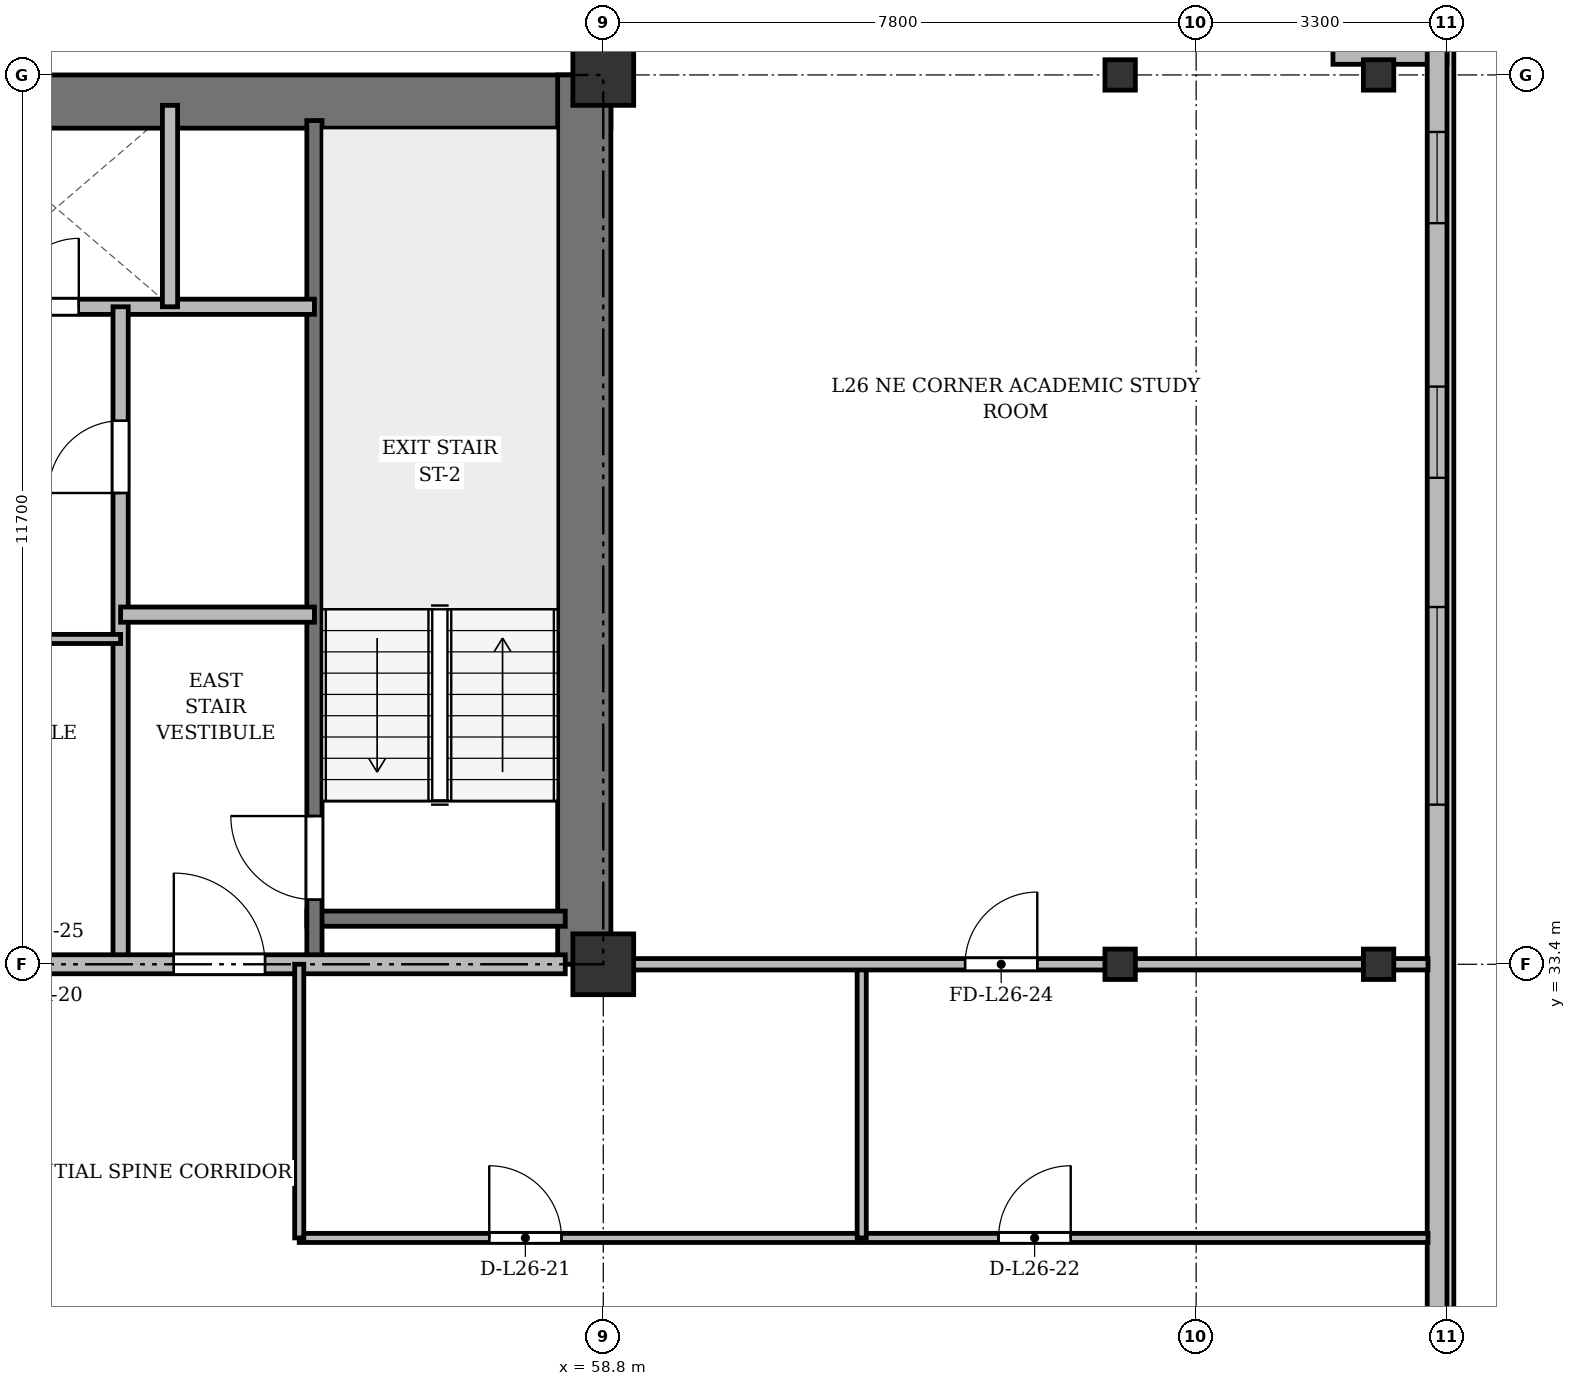
"""IFC4 building model, lengths in metres.
Left out: names, types, materials, properties, quantities, classifications, styles, units other than length and angle.
Written with IfcOpenShell. Run it as: python <this file> out.ifc"""

import sys

from ifc_helpers import new_model, si_unit, direction, frame, frame_2d, origin, origin_2d, place, context, subcontext, project, spatial, rectangle, i_section, extrude, source, transform, mapped, element, fill, save


model = new_model("IFC4")
c1 = context("Model", 3, precision=1e-05, world=origin(), true_north=direction((0.0, 1.0)))
c2 = subcontext(c1, "Body", "Model", "MODEL_VIEW")
j1 = project(units=[si_unit("LENGTHUNIT", "METRE"), si_unit("PLANEANGLEUNIT", "RADIAN")], contexts=[c1])
p1 = place(None, origin())
s1 = spatial("IfcSite", under=j1, at=p1, CompositionType="ELEMENT")
p2 = place(p1, origin())
s2 = spatial("IfcBuilding", under=s1, at=p2, CompositionType="ELEMENT")
p3 = place(p2, frame((0.0, 0.0, 103.3)))
s3 = spatial("IfcBuildingStorey", under=s2, at=p3, CompositionType="ELEMENT", Elevation=103.3)
m1 = source(origin(), c2, "Body", "SweptSolid", [
    extrude(rectangle(XDim=0.8, YDim=0.8, at=origin_2d()), origin(), (0.0, 0.0, 1.0), 3.6),
])
for number, where, z_axis, x_axis in (
    (1, (58.8, 33.4, 0.0), (0.0, 0.0, 1.0), (1.0, 0.0, 0.0)),
    (2, (58.8, 45.1, 0.0), (0.0, 0.0, 1.0), (1.0, 0.0, 0.0)),
):
    element("IfcColumn", number, at=place(p3, frame(where, z_axis=z_axis, x_axis=x_axis)), inside=s3, PredefinedType="COLUMN", context=c2, shape_type="MappedRepresentation", body=[
        mapped(m1, transform((0.0, 0.0, 0.0), x_axis=(1.0, 0.0, 0.0), y_axis=(0.0, 1.0, 0.0), z_axis=(0.0, 0.0, 1.0), scale=1.0)),
    ])
m2 = source(origin(), c2, "Body", "SweptSolid", [
    extrude(i_section(OverallWidth=0.4, OverallDepth=0.4, WebThickness=0.022, FlangeThickness=0.035, at=origin_2d()), origin(), (0.0, 0.0, 1.0), 3.6),
])
for number, where, z_axis, x_axis in (
    (3, (65.6, 33.4, 0.0), (0.0, 0.0, 1.0), (1.0, 0.0, 0.0)),
    (4, (65.6, 45.1, 0.0), (0.0, 0.0, 1.0), (1.0, 0.0, 0.0)),
    (5, (69.0, 33.4, 0.0), (0.0, 0.0, 1.0), (1.0, 0.0, 0.0)),
    (6, (69.0, 45.1, 0.0), (0.0, 0.0, 1.0), (1.0, 0.0, 0.0)),
):
    element("IfcColumn", number, at=place(p3, frame(where, z_axis=z_axis, x_axis=x_axis)), inside=s3, PredefinedType="COLUMN", context=c2, shape_type="MappedRepresentation", body=[
        mapped(m2, transform((0.0, 0.0, 0.0), x_axis=(1.0, 0.0, 0.0), y_axis=(0.0, 1.0, 0.0), z_axis=(0.0, 0.0, 1.0), scale=1.0)),
    ])
p4 = place(p3, frame((68.4, 45.37, 0.0), z_axis=(0.0, 0.0, 1.0), x_axis=(1.0, 0.0, 0.0)))
e7 = element("IfcWall", 7, at=p4, inside=s3, PredefinedType="SOLIDWALL", context=c2, shape_type="SweptSolid", body=[
    extrude(rectangle(XDim=1.5, YDim=0.26, at=frame_2d((0.75, 0.0))), origin(), (0.0, 0.0, 1.0), 2.752),
])
p5 = place(p3, frame((69.77, 45.5, 0.0), z_axis=(0.0, 0.0, 1.0), x_axis=(0.0, -1.0, 0.0)))
e8 = element("IfcWall", 8, at=p5, inside=s3, PredefinedType="SOLIDWALL", context=c2, shape_type="SweptSolid", body=[
    extrude(rectangle(XDim=39.6, YDim=0.26, at=frame_2d((19.8, 0.0))), origin(), (0.0, 0.0, 1.0), 3.34),
])
p6 = place(p5, frame((36.95, 0.0, 0.92)))
e9 = element("IfcOpeningElement", 9, at=p6, cuts=e8, PredefinedType="OPENING", context=c2, shape_type="SweptSolid", body=[
    extrude(rectangle(XDim=1.2, YDim=1.65, at=frame_2d((0.6, 0.825))), frame((0.0, 0.14, 0.0), z_axis=(0.0, -1.0, 0.0), x_axis=(1.0, 0.0, 0.0)), (0.0, 0.0, 1.0), 0.28),
])
p7 = place(p5, frame((32.8, 0.0, 0.92)))
e10 = element("IfcOpeningElement", 10, at=p7, cuts=e8, PredefinedType="OPENING", context=c2, shape_type="SweptSolid", body=[
    extrude(rectangle(XDim=2.6, YDim=1.9, at=frame_2d((1.3, 0.95))), frame((0.0, 0.14, 0.0), z_axis=(0.0, -1.0, 0.0), x_axis=(1.0, 0.0, 0.0)), (0.0, 0.0, 1.0), 0.28),
])
p8 = place(p5, frame((28.6, 0.0, 0.92)))
e11 = element("IfcOpeningElement", 11, at=p8, cuts=e8, PredefinedType="OPENING", context=c2, shape_type="SweptSolid", body=[
    extrude(rectangle(XDim=2.6, YDim=1.9, at=frame_2d((1.3, 0.95))), frame((0.0, 0.14, 0.0), z_axis=(0.0, -1.0, 0.0), x_axis=(1.0, 0.0, 0.0)), (0.0, 0.0, 1.0), 0.28),
])
p9 = place(p5, frame((21.4, 0.0, 0.92)))
e12 = element("IfcOpeningElement", 12, at=p9, cuts=e8, PredefinedType="OPENING", context=c2, shape_type="SweptSolid", body=[
    extrude(rectangle(XDim=2.6, YDim=1.9, at=frame_2d((1.3, 0.95))), frame((0.0, 0.14, 0.0), z_axis=(0.0, -1.0, 0.0), x_axis=(1.0, 0.0, 0.0)), (0.0, 0.0, 1.0), 0.28),
])
p10 = place(p5, frame((7.4, 0.0, 0.92)))
e13 = element("IfcOpeningElement", 13, at=p10, cuts=e8, PredefinedType="OPENING", context=c2, shape_type="SweptSolid", body=[
    extrude(rectangle(XDim=2.6, YDim=1.9, at=frame_2d((1.3, 0.95))), frame((0.0, 0.14, 0.0), z_axis=(0.0, -1.0, 0.0), x_axis=(1.0, 0.0, 0.0)), (0.0, 0.0, 1.0), 0.28),
])
p11 = place(p5, frame((4.5, 0.0, 0.92)))
e14 = element("IfcOpeningElement", 14, at=p11, cuts=e8, PredefinedType="OPENING", context=c2, shape_type="SweptSolid", body=[
    extrude(rectangle(XDim=1.2, YDim=1.65, at=frame_2d((0.6, 0.825))), frame((0.0, 0.14, 0.0), z_axis=(0.0, -1.0, 0.0), x_axis=(1.0, 0.0, 0.0)), (0.0, 0.0, 1.0), 0.28),
])
p12 = place(p5, frame((1.15, 0.0, 0.92)))
e15 = element("IfcOpeningElement", 15, at=p12, cuts=e8, PredefinedType="OPENING", context=c2, shape_type="SweptSolid", body=[
    extrude(rectangle(XDim=1.2, YDim=1.65, at=frame_2d((0.6, 0.825))), frame((0.0, 0.14, 0.0), z_axis=(0.0, -1.0, 0.0), x_axis=(1.0, 0.0, 0.0)), (0.0, 0.0, 1.0), 0.28),
])
p13 = place(p3, frame((15.5, 44.75, 0.0), z_axis=(0.0, 0.0, 1.0), x_axis=(1.0, 0.0, 0.0)))
e16 = element("IfcWall", 16, at=p13, inside=s3, PredefinedType="SHEAR", context=c2, shape_type="SweptSolid", body=[
    extrude(rectangle(XDim=43.4, YDim=0.7, at=frame_2d((21.7, 0.0))), origin(), (0.0, 0.0, 1.0), 3.34),
])
p14 = place(p3, frame((58.55, 33.4, 0.0), z_axis=(0.0, 0.0, 1.0), x_axis=(0.0, 1.0, 0.0)))
e17 = element("IfcWall", 17, at=p14, inside=s3, PredefinedType="SHEAR", context=c2, shape_type="SweptSolid", body=[
    extrude(rectangle(XDim=11.7, YDim=0.7, at=frame_2d((5.85, 0.0))), origin(), (0.0, 0.0, 1.0), 3.34),
])
p15 = place(p3, frame((54.9, 34.0, 0.0), z_axis=(0.0, 0.0, 1.0), x_axis=(1.0, 0.0, 0.0)))
e18 = element("IfcWall", 18, at=p15, inside=s3, PredefinedType="SHEAR", context=c2, shape_type="SweptSolid", body=[
    extrude(rectangle(XDim=3.4, YDim=0.2, at=frame_2d((1.7, 0.0))), origin(), (0.0, 0.0, 1.0), 3.34),
])
p16 = place(p3, frame((55.0, 33.4, 0.0), z_axis=(0.0, 0.0, 1.0), x_axis=(0.0, 1.0, 0.0)))
e19 = element("IfcWall", 19, at=p16, inside=s3, PredefinedType="SHEAR", context=c2, shape_type="SweptSolid", body=[
    extrude(rectangle(XDim=11.1, YDim=0.2, at=frame_2d((5.55, 0.0))), origin(), (0.0, 0.0, 1.0), 3.34),
])
p17 = place(p16, frame((0.85, 0.0, 0.0)))
e20 = element("IfcOpeningElement", 20, at=p17, cuts=e19, PredefinedType="OPENING", context=c2, shape_type="SweptSolid", body=[
    extrude(rectangle(XDim=1.1, YDim=2.15, at=frame_2d((0.55, 1.075))), frame((0.0, 0.11, 0.0), z_axis=(0.0, -1.0, 0.0), x_axis=(1.0, 0.0, 0.0)), (0.0, 0.0, 1.0), 0.22),
])
p18 = place(p3, frame((47.15, 42.05, 0.0), z_axis=(0.0, 0.0, 1.0), x_axis=(1.0, 0.0, 0.0)))
e21 = element("IfcWall", 21, at=p18, inside=s3, PredefinedType="SOLIDWALL", context=c2, shape_type="SweptSolid", body=[
    extrude(rectangle(XDim=7.85, YDim=0.2, at=frame_2d((3.925, 0.0))), origin(), (0.0, 0.0, 1.0), 2.84),
])
p19 = place(p18, frame((0.75, 0.0, 0.0)))
e22 = element("IfcOpeningElement", 22, at=p19, cuts=e21, PredefinedType="OPENING", context=c2, shape_type="SweptSolid", body=[
    extrude(rectangle(XDim=0.9, YDim=2.1, at=frame_2d((0.45, 1.05))), frame((0.0, 0.11, 0.0), z_axis=(0.0, -1.0, 0.0), x_axis=(1.0, 0.0, 0.0)), (0.0, 0.0, 1.0), 0.22),
])
p20 = place(p18, frame((3.85, 0.0, 0.0)))
e23 = element("IfcOpeningElement", 23, at=p20, cuts=e21, PredefinedType="OPENING", context=c2, shape_type="SweptSolid", body=[
    extrude(rectangle(XDim=0.9, YDim=2.1, at=frame_2d((0.45, 1.05))), frame((0.0, 0.11, 0.0), z_axis=(0.0, -1.0, 0.0), x_axis=(1.0, 0.0, 0.0)), (0.0, 0.0, 1.0), 0.22),
])
p21 = place(p3, frame((53.1, 42.05, 0.0), z_axis=(0.0, 0.0, 1.0), x_axis=(0.0, 1.0, 0.0)))
e24 = element("IfcWall", 24, at=p21, inside=s3, PredefinedType="SOLIDWALL", context=c2, shape_type="SweptSolid", body=[
    extrude(rectangle(XDim=2.65, YDim=0.2, at=frame_2d((1.325, 0.0))), origin(), (0.0, 0.0, 1.0), 3.34),
])
p22 = place(p3, frame((52.45, 33.4, 0.0), z_axis=(0.0, 0.0, 1.0), x_axis=(0.0, 1.0, 0.0)))
e25 = element("IfcWall", 25, at=p22, inside=s3, PredefinedType="PARTITIONING", context=c2, shape_type="SweptSolid", body=[
    extrude(rectangle(XDim=8.65, YDim=0.2, at=frame_2d((4.325, 0.0))), origin(), (0.0, 0.0, 1.0), 2.752),
])
p23 = place(p22, frame((6.2, 0.0, 0.0)))
e26 = element("IfcOpeningElement", 26, at=p23, cuts=e25, PredefinedType="OPENING", context=c2, shape_type="SweptSolid", body=[
    extrude(rectangle(XDim=0.95, YDim=2.15, at=frame_2d((0.475, 1.075))), frame((0.0, 0.11, 0.0), z_axis=(0.0, -1.0, 0.0), x_axis=(1.0, 0.0, 0.0)), (0.0, 0.0, 1.0), 0.22),
])
p24 = place(p3, frame((52.45, 38.0, 0.0), z_axis=(0.0, 0.0, 1.0), x_axis=(1.0, 0.0, 0.0)))
e27 = element("IfcWall", 27, at=p24, inside=s3, PredefinedType="PARTITIONING", context=c2, shape_type="SweptSolid", body=[
    extrude(rectangle(XDim=2.55, YDim=0.2, at=frame_2d((1.275, 0.0))), origin(), (0.0, 0.0, 1.0), 3.34),
])
p25 = place(p3, frame((49.42, 37.68, 0.0), z_axis=(0.0, 0.0, 1.0), x_axis=(1.0, 0.0, 0.0)))
e28 = element("IfcWall", 28, at=p25, inside=s3, PredefinedType="PARTITIONING", context=c2, shape_type="SweptSolid", body=[
    extrude(rectangle(XDim=3.03, YDim=0.12, at=frame_2d((1.515, 0.0))), origin(), (0.0, 0.0, 1.0), 2.84),
])
p26 = place(p3, frame((47.15, 33.4, 0.0), z_axis=(0.0, 0.0, 1.0), x_axis=(1.0, 0.0, 0.0)))
e29 = element("IfcWall", 29, at=p26, inside=s3, PredefinedType="PARTITIONING", context=c2, shape_type="SweptSolid", body=[
    extrude(rectangle(XDim=11.15, YDim=0.25, at=frame_2d((5.575, 0.0))), origin(), (0.0, 0.0, 1.0), 2.752),
])
p27 = place(p26, frame((0.7, 0.0, 0.0)))
e30 = element("IfcOpeningElement", 30, at=p27, cuts=e29, PredefinedType="OPENING", context=c2, shape_type="SweptSolid", body=[
    extrude(rectangle(XDim=0.95, YDim=2.15, at=frame_2d((0.475, 1.075))), frame((0.0, 0.135, 0.0), z_axis=(0.0, -1.0, 0.0), x_axis=(1.0, 0.0, 0.0)), (0.0, 0.0, 1.0), 0.27),
])
p28 = place(p26, frame((6.0, 0.0, 0.0)))
e31 = element("IfcOpeningElement", 31, at=p28, cuts=e29, PredefinedType="OPENING", context=c2, shape_type="SweptSolid", body=[
    extrude(rectangle(XDim=1.2, YDim=2.15, at=frame_2d((0.6, 1.075))), frame((0.0, 0.135, 0.0), z_axis=(0.0, -1.0, 0.0), x_axis=(1.0, 0.0, 0.0)), (0.0, 0.0, 1.0), 0.27),
])
p29 = place(p3, frame((54.8, 29.8, 0.0), z_axis=(0.0, 0.0, 1.0), x_axis=(1.0, 0.0, 0.0)))
e32 = element("IfcWall", 32, at=p29, inside=s3, PredefinedType="PARTITIONING", context=c2, shape_type="SweptSolid", body=[
    extrude(rectangle(XDim=14.85, YDim=0.12, at=frame_2d((7.425, 0.0))), origin(), (0.0, 0.0, 1.0), 2.84),
])
p30 = place(p29, frame((2.5, 0.0, 0.0)))
e33 = element("IfcOpeningElement", 33, at=p30, cuts=e32, PredefinedType="OPENING", context=c2, shape_type="SweptSolid", body=[
    extrude(rectangle(XDim=0.95, YDim=2.15, at=frame_2d((0.475, 1.075))), frame((0.0, 0.07, 0.0), z_axis=(0.0, -1.0, 0.0), x_axis=(1.0, 0.0, 0.0)), (0.0, 0.0, 1.0), 0.14),
])
p31 = place(p29, frame((9.2, 0.0, 0.0)))
e34 = element("IfcOpeningElement", 34, at=p31, cuts=e32, PredefinedType="OPENING", context=c2, shape_type="SweptSolid", body=[
    extrude(rectangle(XDim=0.95, YDim=2.15, at=frame_2d((0.475, 1.075))), frame((0.0, 0.07, 0.0), z_axis=(0.0, -1.0, 0.0), x_axis=(1.0, 0.0, 0.0)), (0.0, 0.0, 1.0), 0.14),
])
for number, where, z_axis, x_axis in (
    (35, (62.2, 29.8, 0.0), (0.0, 0.0, 1.0), (0.0, 1.0, 0.0)),
    (36, (54.8, 29.8, 0.0), (0.0, 0.0, 1.0), (0.0, 1.0, 0.0)),
):
    element("IfcWall", number, at=place(p3, frame(where, z_axis=z_axis, x_axis=x_axis)), inside=s3, PredefinedType="PARTITIONING", context=c2, shape_type="SweptSolid", body=[
        extrude(rectangle(XDim=3.6, YDim=0.12, at=frame_2d((1.8, 0.0))), origin(), (0.0, 0.0, 1.0), 2.752),
    ])
p32 = place(p3, frame((58.8, 33.4, 0.0), z_axis=(0.0, 0.0, 1.0), x_axis=(1.0, 0.0, 0.0)))
e37 = element("IfcWall", 37, at=p32, inside=s3, PredefinedType="PARTITIONING", context=c2, shape_type="SweptSolid", body=[
    extrude(rectangle(XDim=10.85, YDim=0.15, at=frame_2d((5.425, 0.0))), origin(), (0.0, 0.0, 1.0), 2.752),
])
p33 = place(p32, frame((4.76, 0.0, 0.0)))
e38 = element("IfcOpeningElement", 38, at=p33, cuts=e37, PredefinedType="OPENING", context=c2, shape_type="SweptSolid", body=[
    extrude(rectangle(XDim=0.95, YDim=2.15, at=frame_2d((0.475, 1.075))), frame((0.0, 0.085, 0.0), z_axis=(0.0, -1.0, 0.0), x_axis=(1.0, 0.0, 0.0)), (0.0, 0.0, 1.0), 0.17),
])
p34 = place(p3, frame((58.8, 44.75, 0.0), z_axis=(0.0, 0.0, 1.0), x_axis=(0.0, 1.0, 0.0)))
e39 = element("IfcWall", 39, at=p34, inside=s3, PredefinedType="PARTITIONING", context=c2, shape_type="SweptSolid", body=[
    extrude(rectangle(XDim=3.61, YDim=0.15, at=frame_2d((1.805, 0.0))), origin(), (0.0, 0.0, 1.0), 2.84),
])
p35 = place(p34, frame((1.1, 0.0, 0.0)))
e40 = element("IfcOpeningElement", 40, at=p35, cuts=e39, PredefinedType="OPENING", context=c2, shape_type="SweptSolid", body=[
    extrude(rectangle(XDim=0.95, YDim=2.15, at=frame_2d((0.475, 1.075))), frame((0.0, 0.085, 0.0), z_axis=(0.0, -1.0, 0.0), x_axis=(1.0, 0.0, 0.0)), (0.0, 0.0, 1.0), 0.17),
])
m3 = source(origin(), c2, "Body", "SweptSolid", [
    extrude(rectangle(XDim=2.6, YDim=1.9, at=frame_2d((1.3, 0.95))), frame((0.0, 0.03, 0.0), z_axis=(0.0, -1.0, 0.0), x_axis=(1.0, 0.0, 0.0)), (0.0, 0.0, 1.0), 0.06),
])
p36 = place(p10, origin())
e41 = element("IfcWindow", 41, at=p36, inside=s3, PartitioningType="SINGLE_PANEL", PredefinedType="WINDOW", context=c2, shape_type="MappedRepresentation", body=[
    mapped(m3, transform((0.0, 0.0, 0.0), x_axis=(1.0, 0.0, 0.0), y_axis=(0.0, 1.0, 0.0), z_axis=(0.0, 0.0, 1.0), scale=1.0)),
])
fill(e13, e41)
m4 = source(origin(), c2, "Body", "SweptSolid", [
    extrude(rectangle(XDim=1.2, YDim=1.65, at=frame_2d((0.6, 0.825))), frame((0.0, 0.03, 0.0), z_axis=(0.0, -1.0, 0.0), x_axis=(1.0, 0.0, 0.0)), (0.0, 0.0, 1.0), 0.06),
])
p37 = place(p11, origin())
e42 = element("IfcWindow", 42, at=p37, inside=s3, PartitioningType="SINGLE_PANEL", PredefinedType="WINDOW", context=c2, shape_type="MappedRepresentation", body=[
    mapped(m4, transform((0.0, 0.0, 0.0), x_axis=(1.0, 0.0, 0.0), y_axis=(0.0, 1.0, 0.0), z_axis=(0.0, 0.0, 1.0), scale=1.0)),
])
fill(e14, e42)
p38 = place(p12, origin())
e43 = element("IfcWindow", 43, at=p38, inside=s3, PartitioningType="SINGLE_PANEL", PredefinedType="WINDOW", context=c2, shape_type="MappedRepresentation", body=[
    mapped(m4, transform((0.0, 0.0, 0.0), x_axis=(1.0, 0.0, 0.0), y_axis=(0.0, 1.0, 0.0), z_axis=(0.0, 0.0, 1.0), scale=1.0)),
])
fill(e15, e43)
m5 = source(origin(), c2, "Body", "SweptSolid", [
    extrude(rectangle(XDim=1.1, YDim=2.15, at=frame_2d((0.55, 1.075))), frame((0.0, 0.025, 0.0), z_axis=(0.0, -1.0, 0.0), x_axis=(1.0, 0.0, 0.0)), (0.0, 0.0, 1.0), 0.05),
])
p39 = place(p17, origin())
e44 = element("IfcDoor", 44, at=p39, inside=s3, OperationType="SINGLE_SWING_RIGHT", PredefinedType="DOOR", context=c2, shape_type="MappedRepresentation", body=[
    mapped(m5, transform((0.0, 0.0, 0.0), x_axis=(1.0, 0.0, 0.0), y_axis=(0.0, 1.0, 0.0), z_axis=(0.0, 0.0, 1.0), scale=1.0)),
])
fill(e20, e44)
m6 = source(origin(), c2, "Body", "SweptSolid", [
    extrude(rectangle(XDim=0.9, YDim=2.1, at=frame_2d((0.45, 1.05))), frame((0.0, 0.025, 0.0), z_axis=(0.0, -1.0, 0.0), x_axis=(1.0, 0.0, 0.0)), (0.0, 0.0, 1.0), 0.05),
])
p40 = place(p20, origin())
e45 = element("IfcDoor", 45, at=p40, inside=s3, OperationType="SINGLE_SWING_RIGHT", PredefinedType="DOOR", context=c2, shape_type="MappedRepresentation", body=[
    mapped(m6, transform((0.0, 0.0, 0.0), x_axis=(1.0, 0.0, 0.0), y_axis=(0.0, 1.0, 0.0), z_axis=(0.0, 0.0, 1.0), scale=1.0)),
])
fill(e23, e45)
m7 = source(origin(), c2, "Body", "SweptSolid", [
    extrude(rectangle(XDim=0.95, YDim=2.15, at=frame_2d((0.475, 1.075))), frame((0.0, 0.025, 0.0), z_axis=(0.0, -1.0, 0.0), x_axis=(1.0, 0.0, 0.0)), (0.0, 0.0, 1.0), 0.05),
])
p41 = place(p23, origin())
e46 = element("IfcDoor", 46, at=p41, inside=s3, OperationType="SINGLE_SWING_LEFT", PredefinedType="DOOR", context=c2, shape_type="MappedRepresentation", body=[
    mapped(m7, transform((0.0, 0.0, 0.0), x_axis=(1.0, 0.0, 0.0), y_axis=(0.0, 1.0, 0.0), z_axis=(0.0, 0.0, 1.0), scale=1.0)),
])
fill(e26, e46)
m8 = source(origin(), c2, "Body", "SweptSolid", [
    extrude(rectangle(XDim=1.2, YDim=2.15, at=frame_2d((0.6, 1.075))), frame((0.0, 0.025, 0.0), z_axis=(0.0, -1.0, 0.0), x_axis=(1.0, 0.0, 0.0)), (0.0, 0.0, 1.0), 0.05),
])
p42 = place(p28, origin())
e47 = element("IfcDoor", 47, at=p42, inside=s3, OperationType="SINGLE_SWING_LEFT", PredefinedType="DOOR", context=c2, shape_type="MappedRepresentation", body=[
    mapped(m8, transform((0.0, 0.0, 0.0), x_axis=(1.0, 0.0, 0.0), y_axis=(0.0, 1.0, 0.0), z_axis=(0.0, 0.0, 1.0), scale=1.0)),
])
fill(e31, e47)
p43 = place(p30, origin())
e48 = element("IfcDoor", 48, at=p43, inside=s3, OperationType="SINGLE_SWING_LEFT", PredefinedType="DOOR", context=c2, shape_type="MappedRepresentation", body=[
    mapped(m7, transform((0.0, 0.0, 0.0), x_axis=(1.0, 0.0, 0.0), y_axis=(0.0, 1.0, 0.0), z_axis=(0.0, 0.0, 1.0), scale=1.0)),
])
fill(e33, e48)
p44 = place(p31, origin())
e49 = element("IfcDoor", 49, at=p44, inside=s3, OperationType="SINGLE_SWING_RIGHT", PredefinedType="DOOR", context=c2, shape_type="MappedRepresentation", body=[
    mapped(m7, transform((0.0, 0.0, 0.0), x_axis=(1.0, 0.0, 0.0), y_axis=(0.0, 1.0, 0.0), z_axis=(0.0, 0.0, 1.0), scale=1.0)),
])
fill(e34, e49)
p45 = place(p33, origin())
e50 = element("IfcDoor", 50, at=p45, inside=s3, OperationType="SINGLE_SWING_RIGHT", PredefinedType="DOOR", context=c2, shape_type="MappedRepresentation", body=[
    mapped(m7, transform((0.0, 0.0, 0.0), x_axis=(1.0, 0.0, 0.0), y_axis=(0.0, 1.0, 0.0), z_axis=(0.0, 0.0, 1.0), scale=1.0)),
])
fill(e38, e50)
save(model, sys.argv[1])
